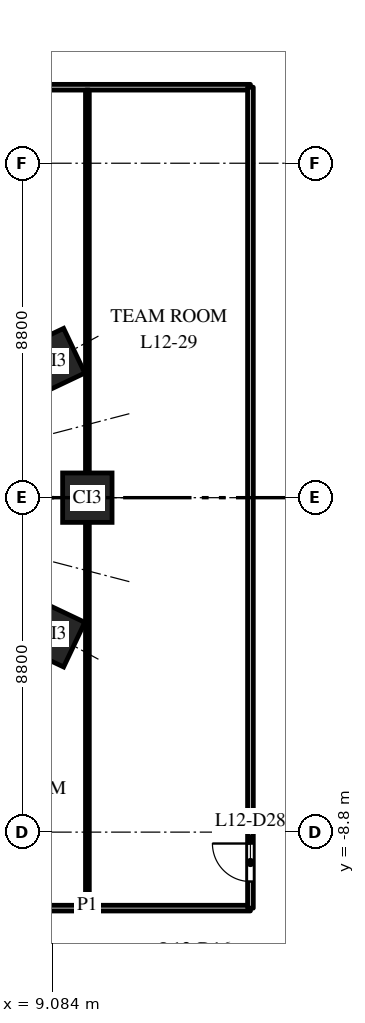
"""IFC4 building model, lengths in metres.
Left out: names, types, materials, properties, quantities, classifications, styles, units other than length and angle.
Written with IfcOpenShell. Run it as: python <this file> out.ifc"""

import sys

from ifc_helpers import new_model, si_unit, direction, frame, frame_2d, origin, origin_2d, place, context, subcontext, project, spatial, rectangle, extrude, element, fill, save


model = new_model("IFC4")
c1 = context("Model", 3, precision=1e-05, world=origin(), true_north=direction((0.0, 1.0)))
c2 = subcontext(c1, "Body", "Model", "MODEL_VIEW")
j1 = project(units=[si_unit("LENGTHUNIT", "METRE"), si_unit("PLANEANGLEUNIT", "RADIAN")], contexts=[c1])
p1 = place(None, origin())
s1 = spatial("IfcSite", under=j1, at=p1, CompositionType="ELEMENT")
p2 = place(p1, origin())
s2 = spatial("IfcBuilding", under=s1, at=p2, CompositionType="ELEMENT")
p3 = place(p2, frame((0.0, 0.0, 58.5)))
s3 = spatial("IfcBuildingStorey", under=s2, at=p3, CompositionType="ELEMENT", Elevation=58.5)
for number, where, z_axis, x_axis in (
    (1, (10.008, 0.0, 0.0), (0.0, 0.0, 1.0), (0.0, 1.0, 0.0)),
    (2, (9.076, 3.588, 0.0), (0.0, 0.0, 1.0), (-0.429, 0.903, 0.0)),
    (3, (9.076, -3.588, 0.0), (0.0, 0.0, 1.0), (0.429, 0.903, 0.0)),
):
    element("IfcColumn", number, at=place(p3, frame(where, z_axis=z_axis, x_axis=x_axis)), inside=s3, PredefinedType="COLUMN", context=c2, shape_type="SweptSolid", body=[
        extrude(rectangle(XDim=1.3, YDim=1.3, at=origin_2d()), origin(), (0.0, 0.0, 1.0), 4.0),
    ])
p4 = place(p3, frame((-14.3, -10.8, 0.0), z_axis=(0.0, 0.0, 1.0), x_axis=(1.0, 0.0, 0.0)))
e4 = element("IfcWall", 4, at=p4, inside=s3, PredefinedType="PARTITIONING", context=c2, shape_type="SweptSolid", body=[
    extrude(rectangle(XDim=28.6, YDim=0.15, at=frame_2d((14.3, 0.0))), origin(), (0.0, 0.0, 1.0), 2.85),
])
p5 = place(p4, frame((13.127, 0.0, 0.0)))
e5 = element("IfcOpeningElement", 5, at=p5, cuts=e4, PredefinedType="OPENING", context=c2, shape_type="SweptSolid", body=[
    extrude(rectangle(XDim=1.0, YDim=2.1, at=frame_2d((0.5, 1.05))), frame((0.0, 0.085, 0.0), z_axis=(0.0, -1.0, 0.0), x_axis=(1.0, 0.0, 0.0)), (0.0, 0.0, 1.0), 0.17),
])
p6 = place(p4, frame((17.893, 0.0, 0.0)))
e6 = element("IfcOpeningElement", 6, at=p6, cuts=e4, PredefinedType="OPENING", context=c2, shape_type="SweptSolid", body=[
    extrude(rectangle(XDim=1.0, YDim=2.1, at=frame_2d((0.5, 1.05))), frame((0.0, 0.085, 0.0), z_axis=(0.0, -1.0, 0.0), x_axis=(1.0, 0.0, 0.0)), (0.0, 0.0, 1.0), 0.17),
])
p7 = place(p3, frame((-14.3, 10.8, 0.0), z_axis=(0.0, 0.0, 1.0), x_axis=(1.0, 0.0, 0.0)))
e7 = element("IfcWall", 7, at=p7, inside=s3, PredefinedType="PARTITIONING", context=c2, shape_type="SweptSolid", body=[
    extrude(rectangle(XDim=28.6, YDim=0.15, at=frame_2d((14.3, 0.0))), origin(), (0.0, 0.0, 1.0), 2.85),
])
p8 = place(p7, frame((13.16, 0.0, 0.0)))
e8 = element("IfcOpeningElement", 8, at=p8, cuts=e7, PredefinedType="OPENING", context=c2, shape_type="SweptSolid", body=[
    extrude(rectangle(XDim=1.0, YDim=2.1, at=frame_2d((0.5, 1.05))), frame((0.0, 0.085, 0.0), z_axis=(0.0, -1.0, 0.0), x_axis=(1.0, 0.0, 0.0)), (0.0, 0.0, 1.0), 0.17),
])
p9 = place(p7, frame((17.927, 0.0, 0.0)))
e9 = element("IfcOpeningElement", 9, at=p9, cuts=e7, PredefinedType="OPENING", context=c2, shape_type="SweptSolid", body=[
    extrude(rectangle(XDim=1.0, YDim=2.1, at=frame_2d((0.5, 1.05))), frame((0.0, 0.085, 0.0), z_axis=(0.0, -1.0, 0.0), x_axis=(1.0, 0.0, 0.0)), (0.0, 0.0, 1.0), 0.17),
])
p10 = place(p7, frame((20.193, 0.0, 0.0)))
e10 = element("IfcOpeningElement", 10, at=p10, cuts=e7, PredefinedType="OPENING", context=c2, shape_type="SweptSolid", body=[
    extrude(rectangle(XDim=1.0, YDim=2.1, at=frame_2d((0.5, 1.05))), frame((0.0, 0.085, 0.0), z_axis=(0.0, -1.0, 0.0), x_axis=(1.0, 0.0, 0.0)), (0.0, 0.0, 1.0), 0.17),
])
p11 = place(p3, frame((10.01, -10.725, 0.0), z_axis=(0.0, 0.0, 1.0), x_axis=(0.0, 1.0, 0.0)))
e11 = element("IfcWall", 11, at=p11, inside=s3, PredefinedType="PARTITIONING", context=c2, shape_type="SweptSolid", body=[
    extrude(rectangle(XDim=21.45, YDim=0.1, at=frame_2d((10.725, 0.0))), origin(), (0.0, 0.0, 1.0), 2.75),
])
p12 = place(p3, frame((14.3, -10.8, 0.0), z_axis=(0.0, 0.0, 1.0), x_axis=(0.0, 1.0, 0.0)))
e12 = element("IfcWall", 12, at=p12, inside=s3, PredefinedType="PARTITIONING", context=c2, shape_type="SweptSolid", body=[
    extrude(rectangle(XDim=21.6, YDim=0.15, at=frame_2d((10.8, 0.0))), origin(), (0.0, 0.0, 1.0), 2.75),
])
p13 = place(p12, frame((0.7, 0.0, 0.0)))
e13 = element("IfcOpeningElement", 13, at=p13, cuts=e12, PredefinedType="OPENING", context=c2, shape_type="SweptSolid", body=[
    extrude(rectangle(XDim=1.0, YDim=2.1, at=frame_2d((0.5, 1.05))), frame((0.0, 0.085, 0.0), z_axis=(0.0, -1.0, 0.0), x_axis=(1.0, 0.0, 0.0)), (0.0, 0.0, 1.0), 0.17),
])
p14 = place(p13, origin())
e14 = element("IfcDoor", 14, at=p14, inside=s3, OperationType="SINGLE_SWING_RIGHT", PredefinedType="DOOR", context=c2, shape_type="SweptSolid", body=[
    extrude(rectangle(XDim=1.0, YDim=2.1, at=frame_2d((0.5, 1.05))), frame((0.0, 0.025, 0.0), z_axis=(0.0, -1.0, 0.0), x_axis=(1.0, 0.0, 0.0)), (0.0, 0.0, 1.0), 0.05),
])
fill(e13, e14)
save(model, sys.argv[1])
